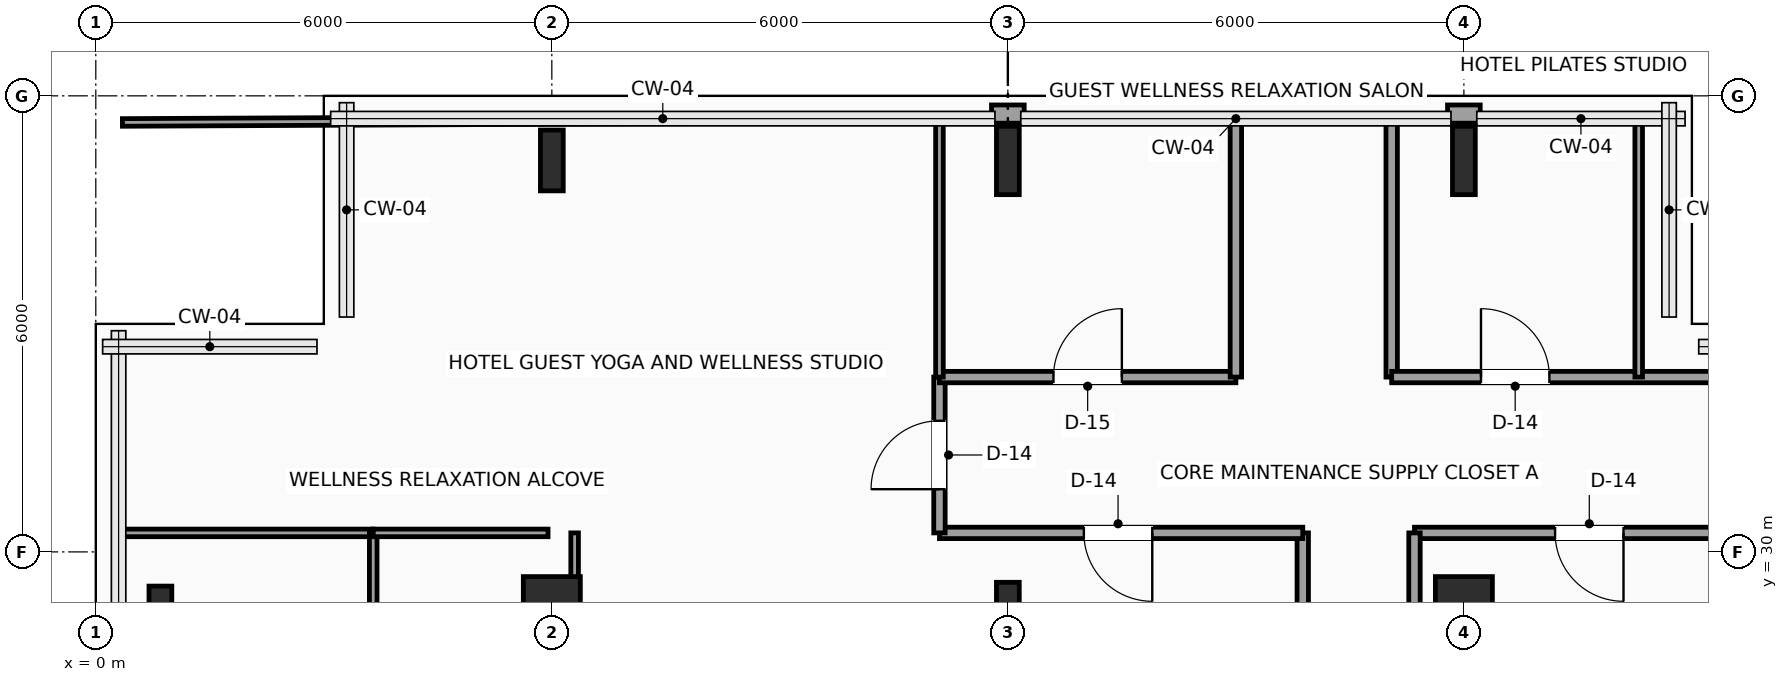
"""IFC4 building model, lengths in metres.
Left out: names, types, materials, properties, quantities, classifications, styles, units other than length and angle.
Written with IfcOpenShell. Run it as: python <this file> out.ifc"""

import sys

from ifc_helpers import new_model, si_unit, direction, frame, frame_2d, origin, origin_2d, place, context, subcontext, project, spatial, rectangle, i_section, extrude, element, fill, save


model = new_model("IFC4")
c1 = context("Model", 3, precision=1e-05, world=origin(), true_north=direction((0.0, 1.0)))
c2 = subcontext(c1, "Body", "Model", "MODEL_VIEW")
j1 = project(units=[si_unit("LENGTHUNIT", "METRE"), si_unit("PLANEANGLEUNIT", "RADIAN")], contexts=[c1])
p1 = place(None, origin())
s1 = spatial("IfcSite", under=j1, at=p1, CompositionType="ELEMENT")
p2 = place(p1, origin())
s2 = spatial("IfcBuilding", under=s1, at=p2, CompositionType="ELEMENT")
p3 = place(p2, frame((0.0, 0.0, 191.7)))
s3 = spatial("IfcBuildingStorey", under=s2, at=p3, CompositionType="ELEMENT", Elevation=191.7)
p4 = place(p3, frame((0.85, 29.15, 0.0), z_axis=(0.0, 0.0, 1.0), x_axis=(1.0, 0.0, 0.0)))
e1 = element("IfcColumn", 1, at=p4, inside=s3, PredefinedType="COLUMN", context=c2, shape_type="SweptSolid", body=[
    extrude(i_section(OverallWidth=0.3, OverallDepth=0.8, WebThickness=0.018, FlangeThickness=0.033, FilletRadius=0.03, at=origin_2d()), origin(), (0.0, 0.0, 1.0), 3.75),
])
p5 = place(p3, frame((6.0, 29.15, 0.0), z_axis=(0.0, 0.0, 1.0), x_axis=(1.0, 0.0, 0.0)))
e2 = element("IfcColumn", 2, at=p5, inside=s3, PredefinedType="COLUMN", context=c2, shape_type="SweptSolid", body=[
    extrude(rectangle(XDim=0.75, YDim=1.05, at=origin_2d()), origin(), (0.0, 0.0, 1.0), 3.75),
])
p6 = place(p3, frame((6.0, 35.15, 0.0), z_axis=(0.0, 0.0, 1.0), x_axis=(1.0, 0.0, 0.0)))
e3 = element("IfcColumn", 3, at=p6, inside=s3, PredefinedType="COLUMN", context=c2, shape_type="SweptSolid", body=[
    extrude(i_section(OverallWidth=0.3, OverallDepth=0.8, WebThickness=0.018, FlangeThickness=0.033, FilletRadius=0.03, at=origin_2d()), origin(), (0.0, 0.0, 1.0), 3.75),
])
for number, where, z_axis, x_axis in (
    (4, (12.0, 29.15, 0.0), (0.0, 0.0, 1.0), (1.0, 0.0, 0.0)),
    (5, (12.0, 35.15, 0.0), (0.0, 0.0, 1.0), (1.0, 0.0, 0.0)),
):
    element("IfcColumn", number, at=place(p3, frame(where, z_axis=z_axis, x_axis=x_axis)), inside=s3, PredefinedType="COLUMN", context=c2, shape_type="SweptSolid", body=[
        extrude(i_section(OverallWidth=0.3, OverallDepth=0.9, WebThickness=0.019, FlangeThickness=0.035, FilletRadius=0.03, at=origin_2d()), origin(), (0.0, 0.0, 1.0), 3.75),
    ])
p7 = place(p3, frame((18.0, 29.15, 0.0), z_axis=(0.0, 0.0, 1.0), x_axis=(1.0, 0.0, 0.0)))
e6 = element("IfcColumn", 6, at=p7, inside=s3, PredefinedType="COLUMN", context=c2, shape_type="SweptSolid", body=[
    extrude(rectangle(XDim=0.75, YDim=1.05, at=origin_2d()), origin(), (0.0, 0.0, 1.0), 3.75),
])
p8 = place(p3, frame((18.0, 35.15, 0.0), z_axis=(0.0, 0.0, 1.0), x_axis=(1.0, 0.0, 0.0)))
e7 = element("IfcColumn", 7, at=p8, inside=s3, PredefinedType="COLUMN", context=c2, shape_type="SweptSolid", body=[
    extrude(i_section(OverallWidth=0.3, OverallDepth=0.9, WebThickness=0.019, FlangeThickness=0.035, FilletRadius=0.03, at=origin_2d()), origin(), (0.0, 0.0, 1.0), 3.75),
])
for number, where, z_axis, x_axis in (
    (8, (11.785, 35.76, 0.0), (0.0, 0.0, 1.0), (1.0, 0.0, 0.0)),
    (9, (17.785, 35.76, 0.0), (0.0, 0.0, 1.0), (1.0, 0.0, 0.0)),
):
    element("IfcWall", number, at=place(p3, frame(where, z_axis=z_axis, x_axis=x_axis)), inside=s3, PredefinedType="SOLIDWALL", context=c2, shape_type="SweptSolid", body=[
        extrude(rectangle(XDim=0.43, YDim=0.24, at=frame_2d((0.215, 0.0))), origin(), (0.0, 0.0, 1.0), 3.54),
    ])
p9 = place(p3, frame((21.95, 30.25, 0.0), z_axis=(0.0, 0.0, 1.0), x_axis=(-1.0, 0.0, 0.0)))
e10 = element("IfcWall", 10, at=p9, inside=s3, PredefinedType="PARTITIONING", context=c2, shape_type="SweptSolid", body=[
    extrude(rectangle(XDim=4.6, YDim=0.15, at=frame_2d((2.3, 0.0))), origin(), (0.0, 0.0, 1.0), 3.54),
])
p10 = place(p9, frame((1.85, 0.0, 0.0)))
e11 = element("IfcOpeningElement", 11, at=p10, cuts=e10, PredefinedType="OPENING", context=c2, shape_type="SweptSolid", body=[
    extrude(rectangle(XDim=0.9, YDim=2.1, at=frame_2d((0.45, 1.05))), frame((0.0, 0.085, 0.0), z_axis=(0.0, -1.0, 0.0), x_axis=(1.0, 0.0, 0.0)), (0.0, 0.0, 1.0), 0.17),
])
for number, where, z_axis, x_axis in (
    (12, (17.35, 30.25, 0.0), (0.0, 0.0, 1.0), (0.0, -1.0, 0.0)),
    (13, (15.88, 27.58, 0.0), (0.0, 0.0, 1.0), (0.0, 1.0, 0.0)),
):
    element("IfcWall", number, at=place(p3, frame(where, z_axis=z_axis, x_axis=x_axis)), inside=s3, PredefinedType="PARTITIONING", context=c2, shape_type="SweptSolid", body=[
        extrude(rectangle(XDim=2.67, YDim=0.15, at=frame_2d((1.335, 0.0))), origin(), (0.0, 0.0, 1.0), 3.54),
    ])
p11 = place(p3, frame((15.88, 30.25, 0.0), z_axis=(0.0, 0.0, 1.0), x_axis=(-1.0, 0.0, 0.0)))
e14 = element("IfcWall", 14, at=p11, inside=s3, PredefinedType="PARTITIONING", context=c2, shape_type="SweptSolid", body=[
    extrude(rectangle(XDim=4.78, YDim=0.15, at=frame_2d((2.39, 0.0))), origin(), (0.0, 0.0, 1.0), 3.54),
])
p12 = place(p11, frame((1.98, 0.0, 0.0)))
e15 = element("IfcOpeningElement", 15, at=p12, cuts=e14, PredefinedType="OPENING", context=c2, shape_type="SweptSolid", body=[
    extrude(rectangle(XDim=0.9, YDim=2.1, at=frame_2d((0.45, 1.05))), frame((0.0, 0.085, 0.0), z_axis=(0.0, -1.0, 0.0), x_axis=(1.0, 0.0, 0.0)), (0.0, 0.0, 1.0), 0.17),
])
p13 = place(p3, frame((11.1, 30.25, 0.0), z_axis=(0.0, 0.0, 1.0), x_axis=(0.0, 1.0, 0.0)))
e16 = element("IfcWall", 16, at=p13, inside=s3, PredefinedType="PARTITIONING", context=c2, shape_type="SweptSolid", body=[
    extrude(rectangle(XDim=2.05, YDim=0.15, at=frame_2d((1.025, 0.0))), origin(), (0.0, 0.0, 1.0), 3.54),
])
p14 = place(p13, frame((0.575, 0.0, 0.0)))
e17 = element("IfcOpeningElement", 17, at=p14, cuts=e16, PredefinedType="OPENING", context=c2, shape_type="SweptSolid", body=[
    extrude(rectangle(XDim=0.9, YDim=2.1, at=frame_2d((0.45, 1.05))), frame((0.0, 0.085, 0.0), z_axis=(0.0, -1.0, 0.0), x_axis=(1.0, 0.0, 0.0)), (0.0, 0.0, 1.0), 0.17),
])
p15 = place(p3, frame((11.1, 32.3, 0.0), z_axis=(0.0, 0.0, 1.0), x_axis=(1.0, 0.0, 0.0)))
e18 = element("IfcWall", 18, at=p15, inside=s3, PredefinedType="PARTITIONING", context=c2, shape_type="SweptSolid", body=[
    extrude(rectangle(XDim=3.9, YDim=0.15, at=frame_2d((1.95, 0.0))), origin(), (0.0, 0.0, 1.0), 3.132),
])
p16 = place(p15, frame((1.5, 0.0, 0.0)))
e19 = element("IfcOpeningElement", 19, at=p16, cuts=e18, PredefinedType="OPENING", context=c2, shape_type="SweptSolid", body=[
    extrude(rectangle(XDim=0.9, YDim=2.1, at=frame_2d((0.45, 1.05))), frame((0.0, 0.085, 0.0), z_axis=(0.0, -1.0, 0.0), x_axis=(1.0, 0.0, 0.0)), (0.0, 0.0, 1.0), 0.17),
])
for number, where, z_axis, x_axis in (
    (20, (15.0, 32.3, 0.0), (0.0, 0.0, 1.0), (0.0, 1.0, 0.0)),
    (21, (17.05, 35.7, 0.0), (0.0, 0.0, 1.0), (0.0, -1.0, 0.0)),
):
    element("IfcWall", number, at=place(p3, frame(where, z_axis=z_axis, x_axis=x_axis)), inside=s3, PredefinedType="PARTITIONING", context=c2, shape_type="SweptSolid", body=[
        extrude(rectangle(XDim=3.4, YDim=0.15, at=frame_2d((1.7, 0.0))), origin(), (0.0, 0.0, 1.0), 3.54),
    ])
p17 = place(p3, frame((17.05, 32.3, 0.0), z_axis=(0.0, 0.0, 1.0), x_axis=(1.0, 0.0, 0.0)))
e22 = element("IfcWall", 22, at=p17, inside=s3, PredefinedType="PARTITIONING", context=c2, shape_type="SweptSolid", body=[
    extrude(rectangle(XDim=4.9, YDim=0.15, at=frame_2d((2.45, 0.0))), origin(), (0.0, 0.0, 1.0), 3.132),
])
p18 = place(p17, frame((1.175, 0.0, 0.0)))
e23 = element("IfcOpeningElement", 23, at=p18, cuts=e22, PredefinedType="OPENING", context=c2, shape_type="SweptSolid", body=[
    extrude(rectangle(XDim=0.9, YDim=2.1, at=frame_2d((0.45, 1.05))), frame((0.0, 0.085, 0.0), z_axis=(0.0, -1.0, 0.0), x_axis=(1.0, 0.0, 0.0)), (0.0, 0.0, 1.0), 0.17),
])
p19 = place(p3, frame((0.3, 30.25, 0.0), z_axis=(0.0, 0.0, 1.0), x_axis=(1.0, 0.0, 0.0)))
e24 = element("IfcWall", 24, at=p19, inside=s3, PredefinedType="PARTITIONING", context=c2, shape_type="SweptSolid", body=[
    extrude(rectangle(XDim=3.35, YDim=0.1, at=frame_2d((1.675, 0.0))), origin(), (0.0, 0.0, 1.0), 3.54),
])
p20 = place(p3, frame((3.65, 18.0, 0.0), z_axis=(0.0, 0.0, 1.0), x_axis=(0.0, 1.0, 0.0)))
e25 = element("IfcWall", 25, at=p20, inside=s3, PredefinedType="PARTITIONING", context=c2, shape_type="SweptSolid", body=[
    extrude(rectangle(XDim=12.25, YDim=0.1, at=frame_2d((6.125, 0.0))), origin(), (0.0, 0.0, 1.0), 3.54),
])
p21 = place(p3, frame((3.65, 30.25, 0.0), z_axis=(0.0, 0.0, 1.0), x_axis=(1.0, 0.0, 0.0)))
e26 = element("IfcWall", 26, at=p21, inside=s3, PredefinedType="PARTITIONING", context=c2, shape_type="SweptSolid", body=[
    extrude(rectangle(XDim=2.3, YDim=0.1, at=frame_2d((1.15, 0.0))), origin(), (0.0, 0.0, 1.0), 3.54),
])
p22 = place(p3, frame((6.3, 27.65, 0.0), z_axis=(0.0, 0.0, 1.0), x_axis=(0.0, 1.0, 0.0)))
e27 = element("IfcWall", 27, at=p22, inside=s3, PredefinedType="PARTITIONING", context=c2, shape_type="SweptSolid", body=[
    extrude(rectangle(XDim=2.6, YDim=0.1, at=frame_2d((1.3, 0.0))), origin(), (0.0, 0.0, 1.0), 3.54),
])
p23 = place(p3, frame((0.35, 35.65, 0.0), z_axis=(0.0, 0.0, 1.0), x_axis=(0.999989162382, 0.004655654485, 0.0)))
e28 = element("IfcWall", 28, at=p23, inside=s3, PredefinedType="PARTITIONING", context=c2, shape_type="SweptSolid", body=[
    extrude(rectangle(XDim=10.75, YDim=0.1, at=frame_2d((5.375, 0.0))), origin(), (0.0, 0.0, 1.0), 3.54),
])
for number, where, z_axis, x_axis in (
    (29, (11.1, 32.3, 0.0), (0.0, 0.0, 1.0), (0.0, 1.0, 0.0)),
    (30, (20.3, 32.3, 0.0), (0.0, 0.0, 1.0), (0.0, 1.0, 0.0)),
):
    element("IfcWall", number, at=place(p3, frame(where, z_axis=z_axis, x_axis=x_axis)), inside=s3, PredefinedType="PARTITIONING", context=c2, shape_type="SweptSolid", body=[
        extrude(rectangle(XDim=3.4, YDim=0.1, at=frame_2d((1.7, 0.0))), origin(), (0.0, 0.0, 1.0), 3.54),
    ])
p24 = place(p10, origin())
e31 = element("IfcDoor", 31, at=p24, inside=s3, OperationType="SINGLE_SWING_LEFT", PredefinedType="DOOR", context=c2, shape_type="SweptSolid", body=[
    extrude(rectangle(XDim=0.9, YDim=2.1, at=frame_2d((0.45, 1.05))), frame((0.0, 0.025, 0.0), z_axis=(0.0, -1.0, 0.0), x_axis=(1.0, 0.0, 0.0)), (0.0, 0.0, 1.0), 0.05),
])
fill(e11, e31)
p25 = place(p12, origin())
e32 = element("IfcDoor", 32, at=p25, inside=s3, OperationType="SINGLE_SWING_LEFT", PredefinedType="DOOR", context=c2, shape_type="SweptSolid", body=[
    extrude(rectangle(XDim=0.9, YDim=2.1, at=frame_2d((0.45, 1.05))), frame((0.0, 0.025, 0.0), z_axis=(0.0, -1.0, 0.0), x_axis=(1.0, 0.0, 0.0)), (0.0, 0.0, 1.0), 0.05),
])
fill(e15, e32)
p26 = place(p14, origin())
e33 = element("IfcDoor", 33, at=p26, inside=s3, OperationType="SINGLE_SWING_LEFT", PredefinedType="DOOR", context=c2, shape_type="SweptSolid", body=[
    extrude(rectangle(XDim=0.9, YDim=2.1, at=frame_2d((0.45, 1.05))), frame((0.0, 0.025, 0.0), z_axis=(0.0, -1.0, 0.0), x_axis=(1.0, 0.0, 0.0)), (0.0, 0.0, 1.0), 0.05),
])
fill(e17, e33)
p27 = place(p16, origin())
e34 = element("IfcDoor", 34, at=p27, inside=s3, OperationType="SINGLE_SWING_RIGHT", PredefinedType="DOOR", context=c2, shape_type="SweptSolid", body=[
    extrude(rectangle(XDim=0.9, YDim=2.1, at=frame_2d((0.45, 1.05))), frame((0.0, 0.025, 0.0), z_axis=(0.0, -1.0, 0.0), x_axis=(1.0, 0.0, 0.0)), (0.0, 0.0, 1.0), 0.05),
])
fill(e19, e34)
p28 = place(p18, origin())
e35 = element("IfcDoor", 35, at=p28, inside=s3, OperationType="SINGLE_SWING_LEFT", PredefinedType="DOOR", context=c2, shape_type="SweptSolid", body=[
    extrude(rectangle(XDim=0.9, YDim=2.1, at=frame_2d((0.45, 1.05))), frame((0.0, 0.025, 0.0), z_axis=(0.0, -1.0, 0.0), x_axis=(1.0, 0.0, 0.0)), (0.0, 0.0, 1.0), 0.05),
])
fill(e23, e35)
save(model, sys.argv[1])
